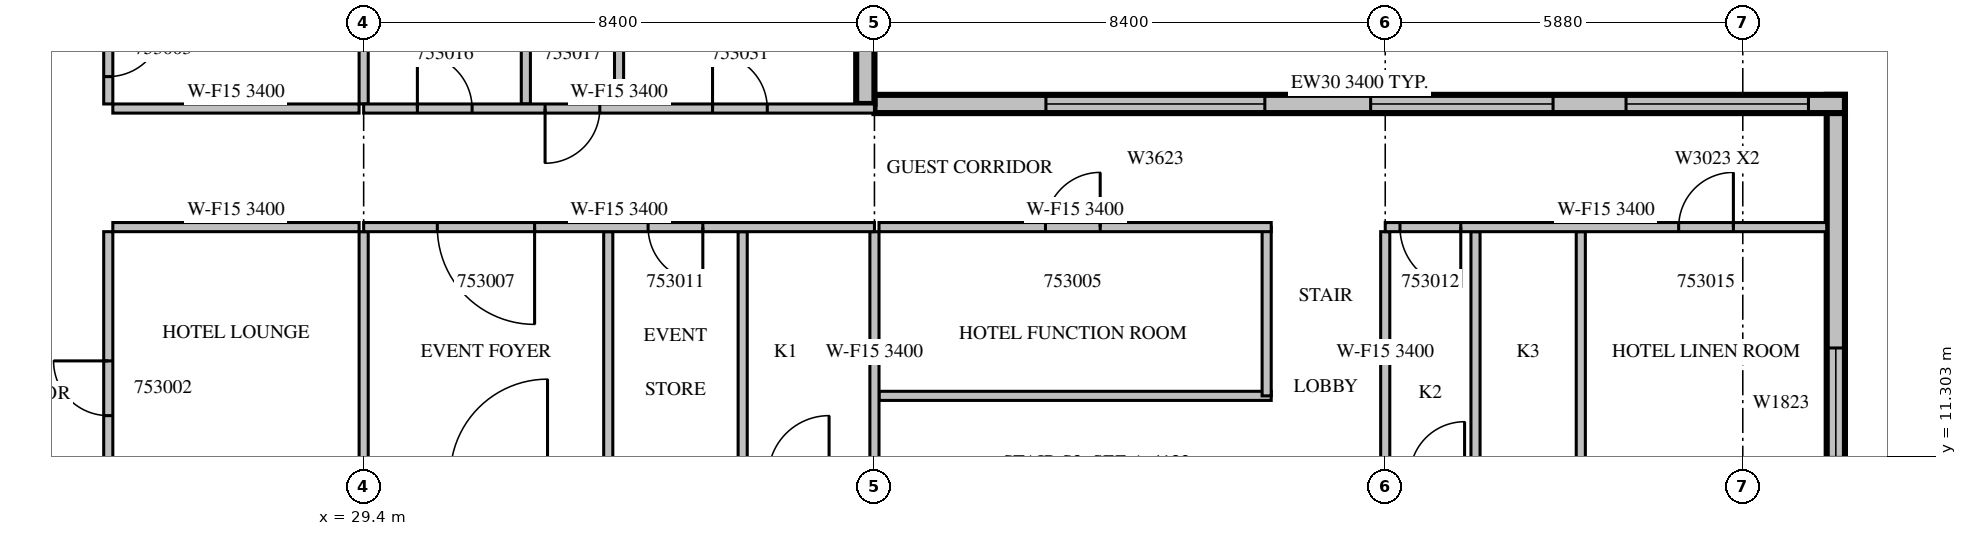
"""IFC4 building model, lengths in metres.
Left out: names, types, materials, properties, quantities, classifications, styles, units other than length and angle.
Written with IfcOpenShell. Run it as: python <this file> out.ifc"""

import sys

from ifc_helpers import new_model, si_unit, direction, frame, frame_2d, origin, place, context, subcontext, project, spatial, rectangle, extrude, source, transform, mapped, element, fill, save


model = new_model("IFC4")
c1 = context("Model", 3, precision=1e-05, world=origin(), true_north=direction((0.0, 1.0)))
c2 = subcontext(c1, "Body", "Model", "MODEL_VIEW")
j1 = project(units=[si_unit("LENGTHUNIT", "METRE"), si_unit("PLANEANGLEUNIT", "RADIAN")], contexts=[c1])
p1 = place(None, origin())
s1 = spatial("IfcSite", under=j1, at=p1, CompositionType="ELEMENT")
p2 = place(p1, origin())
s2 = spatial("IfcBuilding", under=s1, at=p2, CompositionType="ELEMENT")
p3 = place(p2, frame((0.0, 0.0, 234.8)))
s3 = spatial("IfcBuildingStorey", under=s2, at=p3, CompositionType="ELEMENT", Elevation=234.8)
m1 = source(origin(), c2, "Body", "SweptSolid", [
    extrude(rectangle(XDim=6.75, YDim=0.3, at=frame_2d((3.375, 0.0))), origin(), (0.0, 0.0, 1.0), 3.4),
])
p4 = place(p3, frame((53.61, 10.5, 0.0), z_axis=(0.0, 0.0, 1.0), x_axis=(0.0, 1.0, 0.0)))
e1 = element("IfcWall", 1, at=p4, inside=s3, PredefinedType="STANDARD", context=c2, shape_type="MappedRepresentation", body=[
    mapped(m1, transform((0.0, 0.0, 0.0), scale=1.0)),
])
m2 = source(origin(), c2, "Body", "SweptSolid", [
    extrude(rectangle(XDim=1.8, YDim=2.3, at=frame_2d((0.9, 1.15))), frame((0.0, 0.16, 0.0), z_axis=(0.0, -1.0, 0.0), x_axis=(1.0, 0.0, 0.0)), (0.0, 0.0, 1.0), 0.32),
])
p5 = place(p4, frame((0.787, 0.0, 0.6)))
e2 = element("IfcOpeningElement", 2, at=p5, cuts=e1, PredefinedType="OPENING", context=c2, shape_type="MappedRepresentation", body=[
    mapped(m2, transform((0.0, 0.0, 0.0), scale=1.0)),
])
m3 = source(origin(), c2, "Body", "SweptSolid", [
    extrude(rectangle(XDim=15.96, YDim=0.3, at=frame_2d((7.98, 0.0))), origin(), (0.0, 0.0, 1.0), 3.4),
])
p6 = place(p3, frame((53.76, 17.1, 0.0), z_axis=(0.0, 0.0, 1.0), x_axis=(-1.0, 0.0, 0.0)))
e3 = element("IfcWall", 3, at=p6, inside=s3, PredefinedType="STANDARD", context=c2, shape_type="MappedRepresentation", body=[
    mapped(m3, transform((0.0, 0.0, 0.0), scale=1.0)),
])
m4 = source(origin(), c2, "Body", "SweptSolid", [
    extrude(rectangle(XDim=3.0, YDim=2.3, at=frame_2d((1.5, 1.15))), frame((0.0, 0.16, 0.0), z_axis=(0.0, -1.0, 0.0), x_axis=(1.0, 0.0, 0.0)), (0.0, 0.0, 1.0), 0.32),
])
p7 = place(p6, frame((0.6, 0.0, 0.6)))
e4 = element("IfcOpeningElement", 4, at=p7, cuts=e3, PredefinedType="OPENING", context=c2, shape_type="MappedRepresentation", body=[
    mapped(m4, transform((0.0, 0.0, 0.0), scale=1.0)),
])
p8 = place(p6, frame((4.8, 0.0, 0.6)))
e5 = element("IfcOpeningElement", 5, at=p8, cuts=e3, PredefinedType="OPENING", context=c2, shape_type="MappedRepresentation", body=[
    mapped(m4, transform((0.0, 0.0, 0.0), scale=1.0)),
])
m5 = source(origin(), c2, "Body", "SweptSolid", [
    extrude(rectangle(XDim=3.6, YDim=2.3, at=frame_2d((1.8, 1.15))), frame((0.0, 0.16, 0.0), z_axis=(0.0, -1.0, 0.0), x_axis=(1.0, 0.0, 0.0)), (0.0, 0.0, 1.0), 0.32),
])
p9 = place(p6, frame((9.54, 0.0, 0.6)))
e6 = element("IfcOpeningElement", 6, at=p9, cuts=e3, PredefinedType="OPENING", context=c2, shape_type="MappedRepresentation", body=[
    mapped(m5, transform((0.0, 0.0, 0.0), scale=1.0)),
])
m6 = source(origin(), c2, "Body", "SweptSolid", [
    extrude(rectangle(XDim=3.1, YDim=0.3, at=frame_2d((1.55, 0.0))), origin(), (0.0, 0.0, 1.0), 3.4),
])
p10 = place(p3, frame((37.65, 17.1, 0.0), z_axis=(0.0, 0.0, 1.0), x_axis=(0.0, 1.0, 0.0)))
e7 = element("IfcWall", 7, at=p10, inside=s3, PredefinedType="STANDARD", context=c2, shape_type="MappedRepresentation", body=[
    mapped(m6, transform((0.0, 0.0, 0.0), scale=1.0)),
])
p11 = place(p10, frame((1.125, 0.0, 0.6)))
e8 = element("IfcOpeningElement", 8, at=p11, cuts=e7, PredefinedType="OPENING", context=c2, shape_type="MappedRepresentation", body=[
    mapped(m2, transform((0.0, 0.0, 0.0), scale=1.0)),
])
m7 = source(origin(), c2, "Body", "SweptSolid", [
    extrude(rectangle(XDim=11.525, YDim=0.15, at=frame_2d((5.763, 0.0))), origin(), (0.0, 0.0, 1.0), 3.4),
])
p12 = place(p3, frame((25.2, 15.0, 0.0), z_axis=(0.0, 0.0, 1.0), x_axis=(0.0, -1.0, 0.0)))
e9 = element("IfcWall", 9, at=p12, inside=s3, PredefinedType="PARTITIONING", context=c2, shape_type="MappedRepresentation", body=[
    mapped(m7, transform((0.0, 0.0, 0.0), scale=1.0)),
])
m8 = source(origin(), c2, "Body", "SweptSolid", [
    extrude(rectangle(XDim=0.9, YDim=2.1, at=frame_2d((0.45, 1.05))), frame((0.0, 0.085, 0.0), z_axis=(0.0, -1.0, 0.0), x_axis=(1.0, 0.0, 0.0)), (0.0, 0.0, 1.0), 0.17),
])
p13 = place(p12, frame((8.762, 0.0, 0.0)))
e10 = element("IfcOpeningElement", 10, at=p13, cuts=e9, PredefinedType="OPENING", context=c2, shape_type="MappedRepresentation", body=[
    mapped(m8, transform((0.0, 0.0, 0.0), scale=1.0)),
])
p14 = place(p12, frame((2.125, 0.0, 0.0)))
e11 = element("IfcOpeningElement", 11, at=p14, cuts=e9, PredefinedType="OPENING", context=c2, shape_type="MappedRepresentation", body=[
    mapped(m8, transform((0.0, 0.0, 0.0), scale=1.0)),
])
m9 = source(origin(), c2, "Body", "SweptSolid", [
    extrude(rectangle(XDim=3.6, YDim=0.15, at=frame_2d((1.8, 0.0))), origin(), (0.0, 0.0, 1.0), 3.4),
])
p15 = place(p3, frame((25.2, 20.7, 0.0), z_axis=(0.0, 0.0, 1.0), x_axis=(0.0, -1.0, 0.0)))
e12 = element("IfcWall", 12, at=p15, inside=s3, PredefinedType="PARTITIONING", context=c2, shape_type="MappedRepresentation", body=[
    mapped(m9, transform((0.0, 0.0, 0.0), scale=1.0)),
])
p16 = place(p15, frame((2.25, 0.0, 0.0)))
e13 = element("IfcOpeningElement", 13, at=p16, cuts=e12, PredefinedType="OPENING", context=c2, shape_type="MappedRepresentation", body=[
    mapped(m8, transform((0.0, 0.0, 0.0), scale=1.0)),
])
m10 = source(origin(), c2, "Body", "SweptSolid", [
    extrude(rectangle(XDim=4.05, YDim=0.15, at=frame_2d((2.025, 0.0))), origin(), (0.0, 0.0, 1.0), 3.4),
])
for number, where, z_axis, x_axis in (
    (14, (29.325, 15.075, 0.0), (0.0, 0.0, 1.0), (-1.0, 0.0, 0.0)),
    (15, (25.275, 17.025, 0.0), (0.0, 0.0, 1.0), (1.0, 0.0, 0.0)),
):
    element("IfcWall", number, at=place(p3, frame(where, z_axis=z_axis, x_axis=x_axis)), inside=s3, PredefinedType="PARTITIONING", context=c2, shape_type="MappedRepresentation", body=[
        mapped(m10, transform((0.0, 0.0, 0.0), scale=1.0)),
    ])
m11 = source(origin(), c2, "Body", "SweptSolid", [
    extrude(rectangle(XDim=4.101, YDim=0.15, at=frame_2d((2.05, 0.0))), origin(), (0.0, 0.0, 1.0), 3.4),
])
p17 = place(p3, frame((29.4, 10.899, 0.0), z_axis=(0.0, 0.0, 1.0), x_axis=(0.0, 1.0, 0.0)))
e16 = element("IfcWall", 16, at=p17, inside=s3, PredefinedType="PARTITIONING", context=c2, shape_type="MappedRepresentation", body=[
    mapped(m11, transform((0.0, 0.0, 0.0), scale=1.0)),
])
m12 = source(origin(), c2, "Body", "SweptSolid", [
    extrude(rectangle(XDim=3.101, YDim=0.15, at=frame_2d((1.55, 0.0))), origin(), (0.0, 0.0, 1.0), 3.4),
])
p18 = place(p3, frame((29.4, 17.1, 0.0), z_axis=(0.0, 0.0, 1.0), x_axis=(0.0, 1.0, 0.0)))
e17 = element("IfcWall", 17, at=p18, inside=s3, PredefinedType="PARTITIONING", context=c2, shape_type="MappedRepresentation", body=[
    mapped(m12, transform((0.0, 0.0, 0.0), scale=1.0)),
])
m13 = source(origin(), c2, "Body", "SweptSolid", [
    extrude(rectangle(XDim=6.45, YDim=0.15, at=frame_2d((3.225, 0.0))), origin(), (0.0, 0.0, 1.0), 3.4),
])
p19 = place(p3, frame((37.875, 12.3, 0.0), z_axis=(0.0, 0.0, 1.0), x_axis=(1.0, 0.0, 0.0)))
e18 = element("IfcWall", 18, at=p19, inside=s3, PredefinedType="PARTITIONING", context=c2, shape_type="MappedRepresentation", body=[
    mapped(m13, transform((0.0, 0.0, 0.0), scale=1.0)),
])
m14 = source(origin(), c2, "Body", "SweptSolid", [
    extrude(rectangle(XDim=2.775, YDim=0.15, at=frame_2d((1.387, 0.0))), origin(), (0.0, 0.0, 1.0), 3.4),
])
p20 = place(p3, frame((44.25, 12.3, 0.0), z_axis=(0.0, 0.0, 1.0), x_axis=(0.0, 1.0, 0.0)))
e19 = element("IfcWall", 19, at=p20, inside=s3, PredefinedType="PARTITIONING", context=c2, shape_type="MappedRepresentation", body=[
    mapped(m14, transform((0.0, 0.0, 0.0), scale=1.0)),
])
p21 = place(p3, frame((44.325, 15.075, 0.0), z_axis=(0.0, 0.0, 1.0), x_axis=(-1.0, 0.0, 0.0)))
e20 = element("IfcWall", 20, at=p21, inside=s3, PredefinedType="PARTITIONING", context=c2, shape_type="MappedRepresentation", body=[
    mapped(m13, transform((0.0, 0.0, 0.0), scale=1.0)),
])
p22 = place(p21, frame((2.812, 0.0, 0.0)))
e21 = element("IfcOpeningElement", 21, at=p22, cuts=e20, PredefinedType="OPENING", context=c2, shape_type="MappedRepresentation", body=[
    mapped(m8, transform((0.0, 0.0, 0.0), scale=1.0)),
])
m15 = source(origin(), c2, "Body", "SweptSolid", [
    extrude(rectangle(XDim=3.95, YDim=0.15, at=frame_2d((1.975, 0.0))), origin(), (0.0, 0.0, 1.0), 3.4),
])
for number, where, z_axis, x_axis in (
    (22, (33.422, 11.05, 0.0), (0.0, 0.0, 1.0), (0.0, 1.0, 0.0)),
    (23, (35.633, 11.05, 0.0), (0.0, 0.0, 1.0), (0.0, 1.0, 0.0)),
    (24, (37.8, 11.05, 0.0), (0.0, 0.0, 1.0), (0.0, 1.0, 0.0)),
    (25, (47.684, 11.05, 0.0), (0.0, 0.0, 1.0), (0.0, 1.0, 0.0)),
    (26, (49.416, 11.05, 0.0), (0.0, 0.0, 1.0), (0.0, 1.0, 0.0)),
    (27, (46.2, 11.05, 0.0), (0.0, 0.0, 1.0), (0.0, 1.0, 0.0)),
):
    element("IfcWall", number, at=place(p3, frame(where, z_axis=z_axis, x_axis=x_axis)), inside=s3, PredefinedType="PARTITIONING", context=c2, shape_type="MappedRepresentation", body=[
        mapped(m15, transform((0.0, 0.0, 0.0), scale=1.0)),
    ])
for number, where, z_axis, x_axis in (
    (28, (32.067, 20.7, 0.0), (0.0, 0.0, 1.0), (0.0, -1.0, 0.0)),
    (29, (33.6, 17.1, 0.0), (0.0, 0.0, 1.0), (0.0, 1.0, 0.0)),
):
    element("IfcWall", number, at=place(p3, frame(where, z_axis=z_axis, x_axis=x_axis)), inside=s3, PredefinedType="PARTITIONING", context=c2, shape_type="MappedRepresentation", body=[
        mapped(m9, transform((0.0, 0.0, 0.0), scale=1.0)),
    ])
m16 = source(origin(), c2, "Body", "SweptSolid", [
    extrude(rectangle(XDim=8.4, YDim=0.15, at=frame_2d((4.2, 0.0))), origin(), (0.0, 0.0, 1.0), 3.4),
])
p23 = place(p3, frame((37.8, 15.075, 0.0), z_axis=(0.0, 0.0, 1.0), x_axis=(-1.0, 0.0, 0.0)))
e30 = element("IfcWall", 30, at=p23, inside=s3, PredefinedType="PARTITIONING", context=c2, shape_type="MappedRepresentation", body=[
    mapped(m16, transform((0.0, 0.0, 0.0), scale=1.0)),
])
m17 = source(origin(), c2, "Body", "SweptSolid", [
    extrude(rectangle(XDim=1.6, YDim=2.1, at=frame_2d((0.8, 1.05))), frame((0.0, 0.085, 0.0), z_axis=(0.0, -1.0, 0.0), x_axis=(1.0, 0.0, 0.0)), (0.0, 0.0, 1.0), 0.17),
])
p24 = place(p23, frame((5.589, 0.0, 0.0)))
e31 = element("IfcOpeningElement", 31, at=p24, cuts=e30, PredefinedType="OPENING", context=c2, shape_type="MappedRepresentation", body=[
    mapped(m17, transform((0.0, 0.0, 0.0), scale=1.0)),
])
p25 = place(p23, frame((2.822, 0.0, 0.0)))
e32 = element("IfcOpeningElement", 32, at=p25, cuts=e30, PredefinedType="OPENING", context=c2, shape_type="MappedRepresentation", body=[
    mapped(m8, transform((0.0, 0.0, 0.0), scale=1.0)),
])
m18 = source(origin(), c2, "Body", "SweptSolid", [
    extrude(rectangle(XDim=7.26, YDim=0.15, at=frame_2d((3.63, 0.0))), origin(), (0.0, 0.0, 1.0), 3.4),
])
p26 = place(p3, frame((53.46, 15.075, 0.0), z_axis=(0.0, 0.0, 1.0), x_axis=(-1.0, 0.0, 0.0)))
e33 = element("IfcWall", 33, at=p26, inside=s3, PredefinedType="PARTITIONING", context=c2, shape_type="MappedRepresentation", body=[
    mapped(m18, transform((0.0, 0.0, 0.0), scale=1.0)),
])
m19 = source(origin(), c2, "Body", "SweptSolid", [
    extrude(rectangle(XDim=1.0, YDim=2.1, at=frame_2d((0.5, 1.05))), frame((0.0, 0.085, 0.0), z_axis=(0.0, -1.0, 0.0), x_axis=(1.0, 0.0, 0.0)), (0.0, 0.0, 1.0), 0.17),
])
p27 = place(p26, frame((6.018, 0.0, 0.0)))
e34 = element("IfcOpeningElement", 34, at=p27, cuts=e33, PredefinedType="OPENING", context=c2, shape_type="MappedRepresentation", body=[
    mapped(m19, transform((0.0, 0.0, 0.0), scale=1.0)),
])
p28 = place(p26, frame((1.534, 0.0, 0.0)))
e35 = element("IfcOpeningElement", 35, at=p28, cuts=e33, PredefinedType="OPENING", context=c2, shape_type="MappedRepresentation", body=[
    mapped(m8, transform((0.0, 0.0, 0.0), scale=1.0)),
])
p29 = place(p3, frame((29.4, 17.025, 0.0), z_axis=(0.0, 0.0, 1.0), x_axis=(1.0, 0.0, 0.0)))
e36 = element("IfcWall", 36, at=p29, inside=s3, PredefinedType="PARTITIONING", context=c2, shape_type="MappedRepresentation", body=[
    mapped(m16, transform((0.0, 0.0, 0.0), scale=1.0)),
])
p30 = place(p29, frame((0.883, 0.0, 0.0)))
e37 = element("IfcOpeningElement", 37, at=p30, cuts=e36, PredefinedType="OPENING", context=c2, shape_type="MappedRepresentation", body=[
    mapped(m8, transform((0.0, 0.0, 0.0), scale=1.0)),
])
p31 = place(p29, frame((2.983, 0.0, 0.0)))
e38 = element("IfcOpeningElement", 38, at=p31, cuts=e36, PredefinedType="OPENING", context=c2, shape_type="MappedRepresentation", body=[
    mapped(m8, transform((0.0, 0.0, 0.0), scale=1.0)),
])
p32 = place(p29, frame((5.737, 0.0, 0.0)))
e39 = element("IfcOpeningElement", 39, at=p32, cuts=e36, PredefinedType="OPENING", context=c2, shape_type="MappedRepresentation", body=[
    mapped(m8, transform((0.0, 0.0, 0.0), scale=1.0)),
])
m20 = source(origin(), c2, "Body", "SweptSolid", [
    extrude(rectangle(XDim=1.8, YDim=2.3, at=frame_2d((0.9, 1.15))), frame((0.0, 0.03, 0.0), z_axis=(0.0, -1.0, 0.0), x_axis=(1.0, 0.0, 0.0)), (0.0, 0.0, 1.0), 0.06),
])
p33 = place(p5, origin())
e40 = element("IfcWindow", 40, at=p33, inside=s3, PartitioningType="SINGLE_PANEL", PredefinedType="WINDOW", context=c2, shape_type="MappedRepresentation", body=[
    mapped(m20, transform((0.0, 0.0, 0.0), scale=1.0)),
])
fill(e2, e40)
m21 = source(origin(), c2, "Body", "SweptSolid", [
    extrude(rectangle(XDim=3.0, YDim=2.3, at=frame_2d((1.5, 1.15))), frame((0.0, 0.03, 0.0), z_axis=(0.0, -1.0, 0.0), x_axis=(1.0, 0.0, 0.0)), (0.0, 0.0, 1.0), 0.06),
])
p34 = place(p7, origin())
e41 = element("IfcWindow", 41, at=p34, inside=s3, PartitioningType="SINGLE_PANEL", PredefinedType="WINDOW", context=c2, shape_type="MappedRepresentation", body=[
    mapped(m21, transform((0.0, 0.0, 0.0), scale=1.0)),
])
fill(e4, e41)
p35 = place(p8, origin())
e42 = element("IfcWindow", 42, at=p35, inside=s3, PartitioningType="SINGLE_PANEL", PredefinedType="WINDOW", context=c2, shape_type="MappedRepresentation", body=[
    mapped(m21, transform((0.0, 0.0, 0.0), scale=1.0)),
])
fill(e5, e42)
m22 = source(origin(), c2, "Body", "SweptSolid", [
    extrude(rectangle(XDim=3.6, YDim=2.3, at=frame_2d((1.8, 1.15))), frame((0.0, 0.03, 0.0), z_axis=(0.0, -1.0, 0.0), x_axis=(1.0, 0.0, 0.0)), (0.0, 0.0, 1.0), 0.06),
])
p36 = place(p9, origin())
e43 = element("IfcWindow", 43, at=p36, inside=s3, PartitioningType="SINGLE_PANEL", PredefinedType="WINDOW", context=c2, shape_type="MappedRepresentation", body=[
    mapped(m22, transform((0.0, 0.0, 0.0), scale=1.0)),
])
fill(e6, e43)
m23 = source(origin(), c2, "Body", "SweptSolid", [
    extrude(rectangle(XDim=0.9, YDim=2.1, at=frame_2d((0.45, 1.05))), frame((0.0, 0.025, 0.0), z_axis=(0.0, -1.0, 0.0), x_axis=(1.0, 0.0, 0.0)), (0.0, 0.0, 1.0), 0.05),
])
p37 = place(p14, origin())
e44 = element("IfcDoor", 44, at=p37, inside=s3, OperationType="SINGLE_SWING_RIGHT", PredefinedType="DOOR", context=c2, shape_type="MappedRepresentation", body=[
    mapped(m23, transform((0.0, 0.0, 0.0), scale=1.0)),
])
fill(e11, e44)
p38 = place(p16, origin())
e45 = element("IfcDoor", 45, at=p38, inside=s3, OperationType="SINGLE_SWING_LEFT", PredefinedType="DOOR", context=c2, shape_type="MappedRepresentation", body=[
    mapped(m23, transform((0.0, 0.0, 0.0), scale=1.0)),
])
fill(e13, e45)
p39 = place(p22, origin())
e46 = element("IfcDoor", 46, at=p39, inside=s3, OperationType="SINGLE_SWING_RIGHT", PredefinedType="DOOR", context=c2, shape_type="MappedRepresentation", body=[
    mapped(m23, transform((0.0, 0.0, 0.0), scale=1.0)),
])
fill(e21, e46)
m24 = source(origin(), c2, "Body", "SweptSolid", [
    extrude(rectangle(XDim=1.6, YDim=2.1, at=frame_2d((0.8, 1.05))), frame((0.0, 0.025, 0.0), z_axis=(0.0, -1.0, 0.0), x_axis=(1.0, 0.0, 0.0)), (0.0, 0.0, 1.0), 0.05),
])
p40 = place(p24, origin())
e47 = element("IfcDoor", 47, at=p40, inside=s3, OperationType="SINGLE_SWING_LEFT", PredefinedType="DOOR", context=c2, shape_type="MappedRepresentation", body=[
    mapped(m24, transform((0.0, 0.0, 0.0), scale=1.0)),
])
fill(e31, e47)
p41 = place(p25, origin())
e48 = element("IfcDoor", 48, at=p41, inside=s3, OperationType="SINGLE_SWING_LEFT", PredefinedType="DOOR", context=c2, shape_type="MappedRepresentation", body=[
    mapped(m23, transform((0.0, 0.0, 0.0), scale=1.0)),
])
fill(e32, e48)
m25 = source(origin(), c2, "Body", "SweptSolid", [
    extrude(rectangle(XDim=1.0, YDim=2.1, at=frame_2d((0.5, 1.05))), frame((0.0, 0.025, 0.0), z_axis=(0.0, -1.0, 0.0), x_axis=(1.0, 0.0, 0.0)), (0.0, 0.0, 1.0), 0.05),
])
p42 = place(p27, origin())
e49 = element("IfcDoor", 49, at=p42, inside=s3, OperationType="SINGLE_SWING_LEFT", PredefinedType="DOOR", context=c2, shape_type="MappedRepresentation", body=[
    mapped(m25, transform((0.0, 0.0, 0.0), scale=1.0)),
])
fill(e34, e49)
p43 = place(p28, origin())
e50 = element("IfcDoor", 50, at=p43, inside=s3, OperationType="SINGLE_SWING_RIGHT", PredefinedType="DOOR", context=c2, shape_type="MappedRepresentation", body=[
    mapped(m23, transform((0.0, 0.0, 0.0), scale=1.0)),
])
fill(e35, e50)
p44 = place(p30, origin())
e51 = element("IfcDoor", 51, at=p44, inside=s3, OperationType="SINGLE_SWING_LEFT", PredefinedType="DOOR", context=c2, shape_type="MappedRepresentation", body=[
    mapped(m23, transform((0.0, 0.0, 0.0), scale=1.0)),
])
fill(e37, e51)
p45 = place(p31, origin())
e52 = element("IfcDoor", 52, at=p45, inside=s3, OperationType="SINGLE_SWING_RIGHT", PredefinedType="DOOR", context=c2, shape_type="MappedRepresentation", body=[
    mapped(m23, transform((0.0, 0.0, 0.0), scale=1.0)),
])
fill(e38, e52)
p46 = place(p32, origin())
e53 = element("IfcDoor", 53, at=p46, inside=s3, OperationType="SINGLE_SWING_LEFT", PredefinedType="DOOR", context=c2, shape_type="MappedRepresentation", body=[
    mapped(m23, transform((0.0, 0.0, 0.0), scale=1.0)),
])
fill(e39, e53)
save(model, sys.argv[1])
